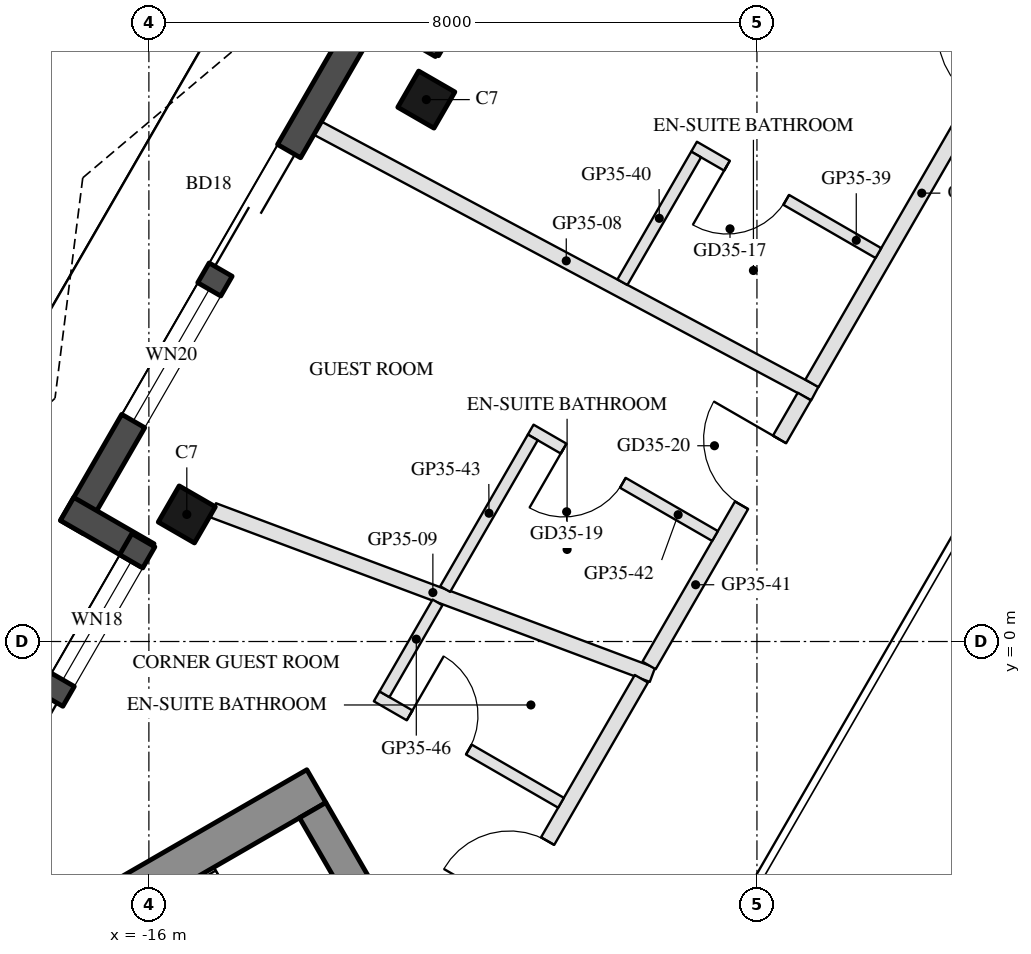
"""IFC4 building model, lengths in metres.
Left out: names, types, materials, properties, quantities, classifications, styles, units other than length and angle.
Written with IfcOpenShell. Run it as: python <this file> out.ifc"""

import sys

from ifc_helpers import new_model, si_unit, direction, frame, frame_2d, origin, origin_2d, place, context, subcontext, project, spatial, rectangle, hollow_rectangle, extrude, boolean, halfspace, element, fill, save


model = new_model("IFC4")
c1 = context("Model", 3, precision=1e-05, world=origin(), true_north=direction((0.0, 1.0)))
c2 = subcontext(c1, "Body", "Model", "MODEL_VIEW")
j1 = project(units=[si_unit("LENGTHUNIT", "METRE"), si_unit("PLANEANGLEUNIT", "RADIAN")], contexts=[c1])
p1 = place(None, origin())
s1 = spatial("IfcSite", under=j1, at=p1, CompositionType="ELEMENT")
p2 = place(p1, origin())
s2 = spatial("IfcBuilding", under=s1, at=p2, CompositionType="ELEMENT")
p3 = place(p2, frame((0.0, 0.0, 324.4)))
s3 = spatial("IfcBuildingStorey", under=s2, at=p3, CompositionType="ELEMENT", Elevation=324.4)
p4 = place(p3, frame((-12.35, 7.13, 0.0), z_axis=(0.0, 0.0, 1.0), x_axis=(0.5, 0.866025403784, 0.0)))
e1 = element("IfcColumn", 1, at=p4, inside=s3, PredefinedType="COLUMN", context=c2, shape_type="SweptSolid", body=[
    boolean("DIFFERENCE", boolean("DIFFERENCE", extrude(hollow_rectangle(XDim=0.55, YDim=0.55, WallThickness=0.025, at=origin_2d()), origin(), (0.0, 0.0, 1.0), 3.7), halfspace(frame((0.0, 0.0, 0.031), z_axis=(0.0, 0.0, 1.0), x_axis=(1.0, 0.0, 0.0)), True)), halfspace(frame((0.0, 0.0, 3.669), z_axis=(0.0, 0.0, 1.0), x_axis=(1.0, 0.0, 0.0)), False)),
])
p5 = place(p3, frame((-15.501, 1.672, 0.0), z_axis=(0.0, 0.0, 1.0), x_axis=(0.5, 0.866025403784, 0.0)))
e2 = element("IfcColumn", 2, at=p5, inside=s3, PredefinedType="COLUMN", context=c2, shape_type="SweptSolid", body=[
    boolean("DIFFERENCE", boolean("DIFFERENCE", extrude(hollow_rectangle(XDim=0.55, YDim=0.55, WallThickness=0.025, at=origin_2d()), origin(), (0.0, 0.0, 1.0), 3.7), halfspace(frame((0.0, 0.0, 0.034), z_axis=(0.0, 0.0, 1.0), x_axis=(1.0, 0.0, 0.0)), True)), halfspace(frame((0.0, 0.0, 3.666), z_axis=(0.0, 0.0, 1.0), x_axis=(1.0, 0.0, 0.0)), False)),
])
p6 = place(p3, frame((-9.77, 12.249, 0.0), z_axis=(0.0, 0.0, 1.0), x_axis=(-0.499999159329, -0.866025889145, 0.0)))
e3 = element("IfcWall", 3, at=p6, inside=s3, PredefinedType="SOLIDWALL", context=c2, shape_type="SweptSolid", body=[
    extrude(rectangle(XDim=5.143, YDim=0.35, at=frame_2d((2.571, 0.0))), origin(), (0.0, 0.0, 1.0), 3.55),
])
p7 = place(p6, frame((0.32, 0.0, 0.3)))
e4 = element("IfcOpeningElement", 4, at=p7, cuts=e3, PredefinedType="OPENING", context=c2, shape_type="SweptSolid", body=[
    extrude(rectangle(XDim=2.1, YDim=2.65, at=frame_2d((1.05, 1.325))), frame((0.0, 0.185, 0.0), z_axis=(0.0, -1.0, 0.0), x_axis=(1.0, 0.0, 0.0)), (0.0, 0.0, 1.0), 0.37),
])
p8 = place(p6, frame((2.72, 0.0, 0.3)))
e5 = element("IfcOpeningElement", 5, at=p8, cuts=e3, PredefinedType="OPENING", context=c2, shape_type="SweptSolid", body=[
    extrude(rectangle(XDim=2.1, YDim=2.65, at=frame_2d((1.05, 1.325))), frame((0.0, 0.185, 0.0), z_axis=(0.0, -1.0, 0.0), x_axis=(1.0, 0.0, 0.0)), (0.0, 0.0, 1.0), 0.37),
])
p9 = place(p3, frame((-12.143, 7.848, 0.0), z_axis=(0.0, 0.0, 1.0), x_axis=(-0.865955602162, 0.500120880472, 0.0)))
e6 = element("IfcWall", 6, at=p9, inside=s3, PredefinedType="SOLIDWALL", context=c2, shape_type="SweptSolid", body=[
    extrude(rectangle(XDim=1.22, YDim=0.35, at=frame_2d((0.61, 0.0))), origin(), (0.0, 0.0, 1.0), 3.55),
])
p10 = place(p3, frame((-12.961, 8.522, 0.0), z_axis=(0.0, 0.0, 1.0), x_axis=(-0.499995447853, -0.866028031952, 0.0)))
e7 = element("IfcWall", 7, at=p10, inside=s3, PredefinedType="SOLIDWALL", context=c2, shape_type="SweptSolid", body=[
    extrude(rectangle(XDim=8.103, YDim=0.35, at=frame_2d((4.051, 0.0))), origin(), (0.0, 0.0, 1.0), 3.55),
])
p11 = place(p10, frame((2.39, 0.0, 0.0)))
e8 = element("IfcOpeningElement", 8, at=p11, cuts=e7, PredefinedType="OPENING", context=c2, shape_type="SweptSolid", body=[
    extrude(rectangle(XDim=1.8, YDim=2.4, at=frame_2d((0.9, 1.2))), frame((0.0, 0.185, 0.0), z_axis=(0.0, -1.0, 0.0), x_axis=(1.0, 0.0, 0.0)), (0.0, 0.0, 1.0), 0.37),
])
p12 = place(p10, frame((4.49, 0.0, 0.3)))
e9 = element("IfcOpeningElement", 9, at=p12, cuts=e7, PredefinedType="OPENING", context=c2, shape_type="SweptSolid", body=[
    extrude(rectangle(XDim=2.0, YDim=2.65, at=frame_2d((1.0, 1.325))), frame((0.0, 0.185, 0.0), z_axis=(0.0, -1.0, 0.0), x_axis=(1.0, 0.0, 0.0)), (0.0, 0.0, 1.0), 0.37),
])
p13 = place(p3, frame((-17.076, 1.744, 0.0), z_axis=(0.0, 0.0, 1.0), x_axis=(0.866005645448, -0.500034220881, 0.0)))
e10 = element("IfcWall", 10, at=p13, inside=s3, PredefinedType="SOLIDWALL", context=c2, shape_type="SweptSolid", body=[
    extrude(rectangle(XDim=1.22, YDim=0.35, at=frame_2d((0.61, 0.0))), origin(), (0.0, 0.0, 1.0), 3.55),
])
p14 = place(p3, frame((-16.073, 1.333, 0.0), z_axis=(0.0, 0.0, 1.0), x_axis=(-0.499999159329, -0.866025889145, 0.0)))
e11 = element("IfcWall", 11, at=p14, inside=s3, PredefinedType="SOLIDWALL", context=c2, shape_type="SweptSolid", body=[
    extrude(rectangle(XDim=5.143, YDim=0.35, at=frame_2d((2.571, 0.0))), origin(), (0.0, 0.0, 1.0), 3.55),
])
p15 = place(p14, frame((2.422, 0.0, 0.0)))
e12 = element("IfcOpeningElement", 12, at=p15, cuts=e11, PredefinedType="OPENING", context=c2, shape_type="SweptSolid", body=[
    extrude(rectangle(XDim=2.4, YDim=2.4, at=frame_2d((1.2, 1.2))), frame((0.0, 0.185, 0.0), z_axis=(0.0, -1.0, 0.0), x_axis=(1.0, 0.0, 0.0)), (0.0, 0.0, 1.0), 0.37),
])
p16 = place(p14, frame((0.32, 0.0, 0.3)))
e13 = element("IfcOpeningElement", 13, at=p16, cuts=e11, PredefinedType="OPENING", context=c2, shape_type="SweptSolid", body=[
    extrude(rectangle(XDim=1.8, YDim=2.65, at=frame_2d((0.9, 1.325))), frame((0.0, 0.185, 0.0), z_axis=(0.0, -1.0, 0.0), x_axis=(1.0, 0.0, 0.0)), (0.0, 0.0, 1.0), 0.37),
])
p17 = place(p3, frame((-13.797, -1.903, 0.0), z_axis=(0.0, 0.0, 1.0), x_axis=(-0.866030186143, -0.49999171662, 0.0)))
e14 = element("IfcWall", 14, at=p17, inside=s3, PredefinedType="SHEAR", context=c2, shape_type="SweptSolid", body=[
    extrude(rectangle(XDim=8.267, YDim=0.5, at=frame_2d((4.134, 0.0))), origin(), (0.0, 0.0, 1.0), 3.5),
])
p18 = place(p3, frame((-13.845, -2.22, 0.0), z_axis=(0.0, 0.0, 1.0), x_axis=(0.500004234368, -0.866022959057, 0.0)))
e15 = element("IfcWall", 15, at=p18, inside=s3, PredefinedType="SHEAR", context=c2, shape_type="SweptSolid", body=[
    extrude(rectangle(XDim=10.0, YDim=0.4, at=frame_2d((5.0, 0.0))), origin(), (0.0, 0.0, 1.0), 3.5),
])
p19 = place(p18, frame((3.55, 0.0, 0.0)))
e16 = element("IfcOpeningElement", 16, at=p19, cuts=e15, PredefinedType="OPENING", context=c2, shape_type="SweptSolid", body=[
    extrude(rectangle(XDim=1.1, YDim=2.1, at=frame_2d((0.55, 1.05))), frame((0.0, 0.21, 0.0), z_axis=(0.0, -1.0, 0.0), x_axis=(1.0, 0.0, 0.0)), (0.0, 0.0, 1.0), 0.42),
])
p20 = place(p18, frame((5.85, 0.0, 0.0)))
e17 = element("IfcOpeningElement", 17, at=p20, cuts=e15, PredefinedType="OPENING", context=c2, shape_type="SweptSolid", body=[
    extrude(rectangle(XDim=1.4, YDim=2.1, at=frame_2d((0.7, 1.05))), frame((0.0, 0.21, 0.0), z_axis=(0.0, -1.0, 0.0), x_axis=(1.0, 0.0, 0.0)), (0.0, 0.0, 1.0), 0.42),
])
p21 = place(p3, frame((-13.779, 6.754, 0.0), z_axis=(0.0, 0.0, 1.0), x_axis=(0.882189732524, -0.470894123799, 0.0)))
e18 = element("IfcWall", 18, at=p21, inside=s3, PredefinedType="PARTITIONING", context=c2, shape_type="SweptSolid", body=[
    extrude(rectangle(XDim=7.415, YDim=0.2, at=frame_2d((3.707, 0.0))), origin(), (0.0, 0.0, 1.0), 3.1),
])
p22 = place(p3, frame((-15.152, 1.726, 0.0), z_axis=(0.0, 0.0, 1.0), x_axis=(0.936472215665, -0.350741770091, 0.0)))
e19 = element("IfcWall", 19, at=p22, inside=s3, PredefinedType="PARTITIONING", context=c2, shape_type="SweptSolid", body=[
    extrude(rectangle(XDim=6.169, YDim=0.2, at=frame_2d((3.084, 0.0))), origin(), (0.0, 0.0, 1.0), 3.1),
])
p23 = place(p3, frame((-7.277, 3.397, 0.0), z_axis=(0.0, 0.0, 1.0), x_axis=(0.500006917907, 0.866021409692, 0.0)))
e20 = element("IfcWall", 20, at=p23, inside=s3, PredefinedType="PARTITIONING", context=c2, shape_type="SweptSolid", body=[
    extrude(rectangle(XDim=9.633, YDim=0.2, at=frame_2d((4.816, 0.0))), origin(), (0.0, 0.0, 1.0), 3.15),
])
p24 = place(p23, frame((4.316, 0.0, 0.0)))
e21 = element("IfcOpeningElement", 21, at=p24, cuts=e20, PredefinedType="OPENING", context=c2, shape_type="SweptSolid", body=[
    extrude(rectangle(XDim=1.0, YDim=2.1, at=frame_2d((0.5, 1.05))), frame((0.0, 0.11, 0.0), z_axis=(0.0, -1.0, 0.0), x_axis=(1.0, 0.0, 0.0)), (0.0, 0.0, 1.0), 0.22),
])
p25 = place(p3, frame((-6.402, 5.111, 0.0), z_axis=(0.0, 0.0, 1.0), x_axis=(-0.865996816683, 0.500049511043, 0.0)))
e22 = element("IfcWall", 22, at=p25, inside=s3, PredefinedType="PARTITIONING", context=c2, shape_type="SweptSolid", body=[
    extrude(rectangle(XDim=2.8, YDim=0.15, at=frame_2d((1.4, 0.0))), origin(), (0.0, 0.0, 1.0), 3.55),
])
p26 = place(p25, frame((1.4, 0.0, 0.0)))
e23 = element("IfcOpeningElement", 23, at=p26, cuts=e22, PredefinedType="OPENING", context=c2, shape_type="SweptSolid", body=[
    extrude(rectangle(XDim=0.9, YDim=2.1, at=frame_2d((0.45, 1.05))), frame((0.0, 0.085, 0.0), z_axis=(0.0, -1.0, 0.0), x_axis=(1.0, 0.0, 0.0)), (0.0, 0.0, 1.0), 0.17),
])
p27 = place(p3, frame((-8.8, 6.408, 0.0), z_axis=(0.0, 0.0, 1.0), x_axis=(-0.499954779475, -0.866051510293, 0.0)))
e24 = element("IfcWall", 24, at=p27, inside=s3, PredefinedType="PARTITIONING", context=c2, shape_type="SweptSolid", body=[
    extrude(rectangle(XDim=1.941, YDim=0.15, at=frame_2d((0.97, 0.0))), origin(), (0.0, 0.0, 1.0), 3.15),
])
p28 = place(p3, frame((-9.419, -0.314, 0.0), z_axis=(0.0, 0.0, 1.0), x_axis=(0.499982843957, 0.866035308604, 0.0)))
e25 = element("IfcWall", 25, at=p28, inside=s3, PredefinedType="PARTITIONING", context=c2, shape_type="SweptSolid", body=[
    extrude(rectangle(XDim=4.085, YDim=0.2, at=frame_2d((2.042, 0.0))), origin(), (0.0, 0.0, 1.0), 3.15),
])
p29 = place(p28, frame((2.433, 0.0, 0.0)))
e26 = element("IfcOpeningElement", 26, at=p29, cuts=e25, PredefinedType="OPENING", context=c2, shape_type="SweptSolid", body=[
    extrude(rectangle(XDim=1.0, YDim=2.1, at=frame_2d((0.5, 1.05))), frame((0.0, 0.11, 0.0), z_axis=(0.0, -1.0, 0.0), x_axis=(1.0, 0.0, 0.0)), (0.0, 0.0, 1.0), 0.22),
])
p30 = place(p3, frame((-8.552, 1.388, 0.0), z_axis=(0.0, 0.0, 1.0), x_axis=(-0.866056369097, 0.49994636267, 0.0)))
e27 = element("IfcWall", 27, at=p30, inside=s3, PredefinedType="PARTITIONING", context=c2, shape_type="SweptSolid", body=[
    extrude(rectangle(XDim=2.8, YDim=0.15, at=frame_2d((1.4, 0.0))), origin(), (0.0, 0.0, 1.0), 3.15),
])
p31 = place(p30, frame((1.4, 0.0, 0.0)))
e28 = element("IfcOpeningElement", 28, at=p31, cuts=e27, PredefinedType="OPENING", context=c2, shape_type="SweptSolid", body=[
    extrude(rectangle(XDim=0.9, YDim=2.1, at=frame_2d((0.45, 1.05))), frame((0.0, 0.085, 0.0), z_axis=(0.0, -1.0, 0.0), x_axis=(1.0, 0.0, 0.0)), (0.0, 0.0, 1.0), 0.17),
])
p32 = place(p3, frame((-10.949, 2.686, 0.0), z_axis=(0.0, 0.0, 1.0), x_axis=(-0.500012835235, -0.866017993231, 0.0)))
e29 = element("IfcWall", 29, at=p32, inside=s3, PredefinedType="PARTITIONING", context=c2, shape_type="SweptSolid", body=[
    extrude(rectangle(XDim=2.305, YDim=0.15, at=frame_2d((1.152, 0.0))), origin(), (0.0, 0.0, 1.0), 3.15),
])
p33 = place(p3, frame((-12.038, -4.85, 0.0), z_axis=(0.0, 0.0, 1.0), x_axis=(0.500003693016, 0.86602327161, 0.0)))
e30 = element("IfcWall", 30, at=p33, inside=s3, PredefinedType="PARTITIONING", context=c2, shape_type="SweptSolid", body=[
    extrude(rectangle(XDim=5.035, YDim=0.2, at=frame_2d((2.517, 0.0))), origin(), (0.0, 0.0, 1.0), 3.15),
])
p34 = place(p33, frame((1.568, 0.0, 0.0)))
e31 = element("IfcOpeningElement", 31, at=p34, cuts=e30, PredefinedType="OPENING", context=c2, shape_type="SweptSolid", body=[
    extrude(rectangle(XDim=1.0, YDim=2.1, at=frame_2d((0.5, 1.05))), frame((0.0, 0.11, 0.0), z_axis=(0.0, -1.0, 0.0), x_axis=(1.0, 0.0, 0.0)), (0.0, 0.0, 1.0), 0.22),
])
p35 = place(p3, frame((-13.003, -0.722, 0.0), z_axis=(0.0, 0.0, 1.0), x_axis=(0.866056369097, -0.49994636267, 0.0)))
e32 = element("IfcWall", 32, at=p35, inside=s3, PredefinedType="PARTITIONING", context=c2, shape_type="SweptSolid", body=[
    extrude(rectangle(XDim=2.8, YDim=0.15, at=frame_2d((1.4, 0.0))), origin(), (0.0, 0.0, 1.0), 3.55),
])
p36 = place(p35, frame((0.5, 0.0, 0.0)))
e33 = element("IfcOpeningElement", 33, at=p36, cuts=e32, PredefinedType="OPENING", context=c2, shape_type="SweptSolid", body=[
    extrude(rectangle(XDim=0.9, YDim=2.1, at=frame_2d((0.45, 1.05))), frame((0.0, 0.085, 0.0), z_axis=(0.0, -1.0, 0.0), x_axis=(1.0, 0.0, 0.0)), (0.0, 0.0, 1.0), 0.17),
])
p37 = place(p3, frame((-12.203, 0.514, 0.0), z_axis=(0.0, 0.0, 1.0), x_axis=(-0.5000152428, -0.866016603171, 0.0)))
e34 = element("IfcWall", 34, at=p37, inside=s3, PredefinedType="PARTITIONING", context=c2, shape_type="SweptSolid", body=[
    extrude(rectangle(XDim=1.396, YDim=0.15, at=frame_2d((0.698, 0.0))), origin(), (0.0, 0.0, 1.0), 3.15),
])
p38 = place(p11, frame((1.8, 0.0, 0.0), z_axis=(0.0, 0.0, 1.0), x_axis=(-1.0, 0.0, 0.0)))
e35 = element("IfcDoor", 35, at=p38, inside=s3, OperationType="SLIDING_TO_LEFT", PredefinedType="DOOR", context=c2, shape_type="SweptSolid", body=[
    extrude(rectangle(XDim=1.8, YDim=2.4, at=frame_2d((0.9, 1.2))), frame((0.0, 0.025, 0.0), z_axis=(0.0, -1.0, 0.0), x_axis=(1.0, 0.0, 0.0)), (0.0, 0.0, 1.0), 0.05),
])
fill(e8, e35)
p39 = place(p12, origin())
e36 = element("IfcWindow", 36, at=p39, inside=s3, PartitioningType="SINGLE_PANEL", PredefinedType="WINDOW", context=c2, shape_type="SweptSolid", body=[
    extrude(rectangle(XDim=2.0, YDim=2.65, at=frame_2d((1.0, 1.325))), frame((0.0, 0.03, 0.0), z_axis=(0.0, -1.0, 0.0), x_axis=(1.0, 0.0, 0.0)), (0.0, 0.0, 1.0), 0.06),
])
fill(e9, e36)
p40 = place(p15, frame((2.4, 0.0, 0.0), z_axis=(0.0, 0.0, 1.0), x_axis=(-1.0, 0.0, 0.0)))
e37 = element("IfcDoor", 37, at=p40, inside=s3, OperationType="SLIDING_TO_LEFT", PredefinedType="DOOR", context=c2, shape_type="SweptSolid", body=[
    extrude(rectangle(XDim=2.4, YDim=2.4, at=frame_2d((1.2, 1.2))), frame((0.0, 0.025, 0.0), z_axis=(0.0, -1.0, 0.0), x_axis=(1.0, 0.0, 0.0)), (0.0, 0.0, 1.0), 0.05),
])
fill(e12, e37)
p41 = place(p16, origin())
e38 = element("IfcWindow", 38, at=p41, inside=s3, PartitioningType="SINGLE_PANEL", PredefinedType="WINDOW", context=c2, shape_type="SweptSolid", body=[
    extrude(rectangle(XDim=1.8, YDim=2.65, at=frame_2d((0.9, 1.325))), frame((0.0, 0.03, 0.0), z_axis=(0.0, -1.0, 0.0), x_axis=(1.0, 0.0, 0.0)), (0.0, 0.0, 1.0), 0.06),
])
fill(e13, e38)
p42 = place(p26, origin())
e39 = element("IfcDoor", 39, at=p42, inside=s3, OperationType="SINGLE_SWING_RIGHT", PredefinedType="DOOR", context=c2, shape_type="SweptSolid", body=[
    extrude(rectangle(XDim=0.9, YDim=2.1, at=frame_2d((0.45, 1.05))), frame((0.0, 0.025, 0.0), z_axis=(0.0, -1.0, 0.0), x_axis=(1.0, 0.0, 0.0)), (0.0, 0.0, 1.0), 0.05),
])
fill(e23, e39)
p43 = place(p31, origin())
e40 = element("IfcDoor", 40, at=p43, inside=s3, OperationType="SINGLE_SWING_RIGHT", PredefinedType="DOOR", context=c2, shape_type="SweptSolid", body=[
    extrude(rectangle(XDim=0.9, YDim=2.1, at=frame_2d((0.45, 1.05))), frame((0.0, 0.025, 0.0), z_axis=(0.0, -1.0, 0.0), x_axis=(1.0, 0.0, 0.0)), (0.0, 0.0, 1.0), 0.05),
])
fill(e28, e40)
p44 = place(p29, origin())
e41 = element("IfcDoor", 41, at=p44, inside=s3, OperationType="SINGLE_SWING_RIGHT", PredefinedType="DOOR", context=c2, shape_type="SweptSolid", body=[
    extrude(rectangle(XDim=1.0, YDim=2.1, at=frame_2d((0.5, 1.05))), frame((0.0, 0.025, 0.0), z_axis=(0.0, -1.0, 0.0), x_axis=(1.0, 0.0, 0.0)), (0.0, 0.0, 1.0), 0.05),
])
fill(e26, e41)
p45 = place(p36, origin())
e42 = element("IfcDoor", 42, at=p45, inside=s3, OperationType="SINGLE_SWING_LEFT", PredefinedType="DOOR", context=c2, shape_type="SweptSolid", body=[
    extrude(rectangle(XDim=0.9, YDim=2.1, at=frame_2d((0.45, 1.05))), frame((0.0, 0.025, 0.0), z_axis=(0.0, -1.0, 0.0), x_axis=(1.0, 0.0, 0.0)), (0.0, 0.0, 1.0), 0.05),
])
fill(e33, e42)
p46 = place(p34, origin())
e43 = element("IfcDoor", 43, at=p46, inside=s3, OperationType="SINGLE_SWING_LEFT", PredefinedType="DOOR", context=c2, shape_type="SweptSolid", body=[
    extrude(rectangle(XDim=1.0, YDim=2.1, at=frame_2d((0.5, 1.05))), frame((0.0, 0.025, 0.0), z_axis=(0.0, -1.0, 0.0), x_axis=(1.0, 0.0, 0.0)), (0.0, 0.0, 1.0), 0.05),
])
fill(e31, e43)
save(model, sys.argv[1])
